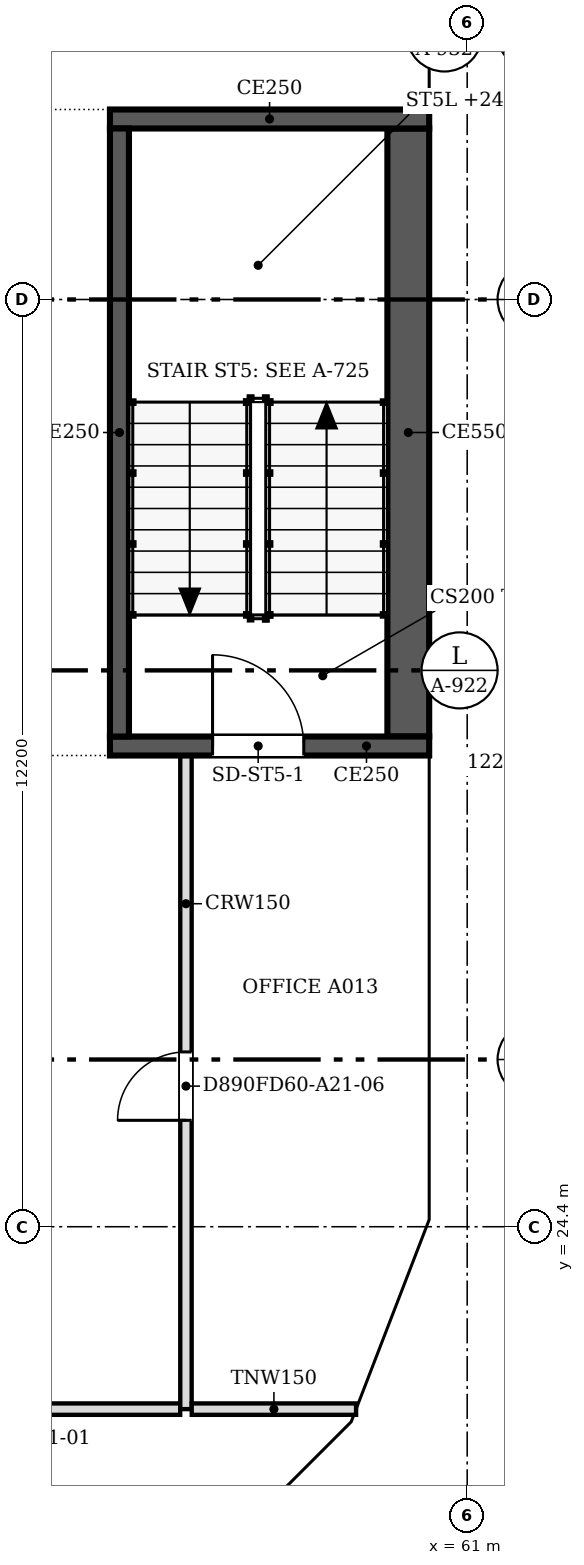
"""IFC4 building model, lengths in metres.
Left out: names, types, materials, properties, quantities, classifications, styles, units other than length and angle.
Written with IfcOpenShell. Run it as: python <this file> out.ifc"""

import sys

from ifc_helpers import new_model, si_unit, direction, frame, frame_2d, origin, place, context, subcontext, project, spatial, polyline, rectangle, outline, extrude, faceted_brep, source, transform, mapped, element, fill, save


model = new_model("IFC4")
c1 = context("Model", 3, precision=1e-05, world=origin(), true_north=direction((0.0, 1.0)))
c2 = subcontext(c1, "Body", "Model", "MODEL_VIEW")
j1 = project(units=[si_unit("LENGTHUNIT", "METRE"), si_unit("PLANEANGLEUNIT", "RADIAN")], contexts=[c1])
p1 = place(None, origin())
s1 = spatial("IfcSite", under=j1, at=p1, CompositionType="ELEMENT")
p2 = place(p1, origin())
s2 = spatial("IfcBuilding", under=s1, at=p2, CompositionType="ELEMENT")
p3 = place(p2, frame((0.0, 0.0, 240.7)))
s3 = spatial("IfcBuildingStorey", under=s2, at=p3, CompositionType="ELEMENT", Elevation=240.7)
m1 = source(origin(), c2, "Body", "Brep", [
    faceted_brep([(0.053, -0.25, 0.0), (2.997, -0.25, 3.8), (0.053, -0.25, 7.6), (0.0, -0.25, 7.532), (0.0, -0.25, 0.068), (0.106, 0.25, 7.532), (2.944, 0.25, 3.868), (2.944, 0.25, 3.732), (0.106, 0.25, 0.068), (2.997, 0.0, 3.8), (0.053, 0.0, 0.0), (0.053, 0.0, 7.6)], [[[0, 1, 2, 3, 4]], [[5, 6, 7, 8]], [[8, 7, 9, 1, 0, 10]], [[6, 5, 11, 2, 1, 9]], [[3, 2, 11]], [[10, 0, 4]], [[8, 10, 4, 3, 11, 5]], [[9, 7, 6]]]),
])
p4 = place(p3, frame((57.569, 19.574, -3.8), z_axis=(0.0, 0.0, 1.0), x_axis=(0.707106781187, 0.707106781187, 0.0)))
e1 = element("IfcWall", 1, at=p4, inside=s3, PredefinedType="SOLIDWALL", context=c2, shape_type="MappedRepresentation", body=[
    mapped(m1, transform((0.0, 0.0, 0.0), scale=1.0)),
])
m2 = source(origin(), c2, "Body", "SweptSolid", [
    extrude(outline(polyline([(0.253, 0.667), (2.681, 3.8), (0.253, 6.934), (0.253, 0.667)])), frame((0.0, 0.26, 0.0), z_axis=(0.0, -1.0, 0.0), x_axis=(1.0, 0.0, 0.0)), (0.0, 0.0, 1.0), 0.52),
])
p5 = place(p4, origin())
e2 = element("IfcOpeningElement", 2, at=p5, cuts=e1, PredefinedType="OPENING", context=c2, shape_type="MappedRepresentation", body=[
    mapped(m2, transform((0.0, 0.0, 0.0), scale=1.0)),
])
m3 = source(origin(), c2, "Body", "Brep", [
    faceted_brep([(2.95, -0.25, 0.0), (2.997, -0.25, 0.059), (2.997, -0.25, 7.541), (2.95, -0.25, 7.6), (0.0, -0.25, 3.8), (0.053, 0.25, 3.868), (2.904, 0.25, 7.54), (2.904, 0.25, 0.06), (0.053, 0.25, 3.732), (2.95, 0.0, 0.0), (2.95, 0.0, 7.6), (0.0, 0.0, 3.8)], [[[0, 1, 2, 3, 4]], [[5, 6, 7, 8]], [[1, 0, 9]], [[10, 3, 2]], [[6, 5, 11, 4, 3, 10]], [[8, 7, 9, 0, 4, 11]], [[8, 11, 5]], [[1, 9, 7, 6, 10, 2]]]),
])
p6 = place(p3, frame((59.688, 21.694, -3.8), z_axis=(0.0, 0.0, 1.0), x_axis=(0.359972353723, 0.932962970624, 0.0)))
e3 = element("IfcWall", 3, at=p6, inside=s3, PredefinedType="SOLIDWALL", context=c2, shape_type="MappedRepresentation", body=[
    mapped(m3, transform((0.0, 0.0, 0.0), scale=1.0)),
])
m4 = source(origin(), c2, "Body", "SweptSolid", [
    extrude(outline(polyline([(2.75, 6.935), (0.316, 3.8), (2.75, 0.665), (2.75, 6.935)])), frame((0.0, 0.26, 0.0), z_axis=(0.0, -1.0, 0.0), x_axis=(1.0, 0.0, 0.0)), (0.0, 0.0, 1.0), 0.52),
])
p7 = place(p6, origin())
e4 = element("IfcOpeningElement", 4, at=p7, cuts=e3, PredefinedType="OPENING", context=c2, shape_type="MappedRepresentation", body=[
    mapped(m4, transform((0.0, 0.0, 0.0), scale=1.0)),
])
m5 = source(origin(), c2, "Body", "Brep", [
    faceted_brep([(0.047, -0.25, 0.0), (3.05, -0.25, 3.8), (0.047, -0.25, 7.6), (0.0, -0.25, 7.54), (0.0, -0.25, 0.06), (0.093, 0.25, 7.541), (3.05, 0.25, 3.8), (0.093, 0.25, 0.059), (0.047, 0.0, 0.0), (0.047, 0.0, 7.6)], [[[0, 1, 2, 3, 4]], [[5, 6, 7]], [[7, 6, 1, 0, 8]], [[6, 5, 9, 2, 1]], [[3, 2, 9]], [[8, 0, 4]], [[7, 8, 4, 3, 9, 5]]]),
])
p8 = place(p3, frame((60.75, 24.4, -3.8), z_axis=(0.0, 0.0, 1.0), x_axis=(0.0, 1.0, 0.0)))
e5 = element("IfcWall", 5, at=p8, inside=s3, PredefinedType="SOLIDWALL", context=c2, shape_type="MappedRepresentation", body=[
    mapped(m5, transform((0.0, 0.0, 0.0), scale=1.0)),
])
m6 = source(origin(), c2, "Body", "SweptSolid", [
    extrude(outline(polyline([(0.247, 0.656), (2.731, 3.8), (0.247, 6.944), (0.247, 0.656)])), frame((0.0, 0.26, 0.0), z_axis=(0.0, -1.0, 0.0), x_axis=(1.0, 0.0, 0.0)), (0.0, 0.0, 1.0), 0.52),
])
p9 = place(p8, origin())
e6 = element("IfcOpeningElement", 6, at=p9, cuts=e5, PredefinedType="OPENING", context=c2, shape_type="MappedRepresentation", body=[
    mapped(m6, transform((0.0, 0.0, 0.0), scale=1.0)),
])
m7 = source(origin(), c2, "Body", "SweptSolid", [
    extrude(outline(polyline([(3.05, 0.0), (6.1, 3.8), (3.05, 7.6), (0.0, 3.8), (3.05, 0.0)])), frame((0.0, 0.25, 0.0), z_axis=(0.0, -1.0, 0.0), x_axis=(1.0, 0.0, 0.0)), (0.0, 0.0, 1.0), 0.5),
])
p10 = place(p3, frame((60.75, 27.45, -3.8), z_axis=(0.0, 0.0, 1.0), x_axis=(0.0, 1.0, 0.0)))
e7 = element("IfcWall", 7, at=p10, inside=s3, PredefinedType="SOLIDWALL", context=c2, shape_type="MappedRepresentation", body=[
    mapped(m7, transform((0.0, 0.0, 0.0), scale=1.0)),
])
m8 = source(origin(), c2, "Body", "SweptSolid", [
    extrude(outline(polyline([(3.05, 0.399), (5.78, 3.8), (3.05, 7.201), (0.321, 3.8), (3.05, 0.399)])), frame((0.0, 0.26, 0.0), z_axis=(0.0, -1.0, 0.0), x_axis=(1.0, 0.0, 0.0)), (0.0, 0.0, 1.0), 0.52),
])
p11 = place(p10, origin())
e8 = element("IfcOpeningElement", 8, at=p11, cuts=e7, PredefinedType="OPENING", context=c2, shape_type="MappedRepresentation", body=[
    mapped(m8, transform((0.0, 0.0, 0.0), scale=1.0)),
])
m9 = source(origin(), c2, "Body", "Brep", [
    faceted_brep([(3.05, -0.25, 0.0), (6.1, -0.25, 3.8), (6.1, -0.25, 3.8), (3.05, -0.25, 7.6), (0.0, -0.25, 3.8), (0.0, 0.25, 3.8), (3.05, 0.25, 7.6), (6.1, 0.25, 3.8), (6.1, 0.25, 3.8), (3.05, 0.25, 0.0)], [[[0, 1, 2, 3, 4]], [[5, 6, 7, 8, 9]], [[9, 8, 1, 0]], [[7, 6, 3, 2]], [[6, 5, 4, 3]], [[5, 9, 0, 4]], [[1, 8, 7, 2]]]),
])
p12 = place(p3, frame((60.75, 33.55, -3.8), z_axis=(0.0, 0.0, 1.0), x_axis=(0.0, 1.0, 0.0)))
e9 = element("IfcWall", 9, at=p12, inside=s3, PredefinedType="SOLIDWALL", context=c2, shape_type="MappedRepresentation", body=[
    mapped(m9, transform((0.0, 0.0, 0.0), scale=1.0)),
])
p13 = place(p12, origin())
e10 = element("IfcOpeningElement", 10, at=p13, cuts=e9, PredefinedType="OPENING", context=c2, shape_type="MappedRepresentation", body=[
    mapped(m8, transform((0.0, 0.0, 0.0), scale=1.0)),
])
p14 = place(p3, frame((60.75, 39.65, -3.8), z_axis=(0.0, 0.0, 1.0), x_axis=(0.0, 1.0, 0.0)))
e11 = element("IfcWall", 11, at=p14, inside=s3, PredefinedType="SOLIDWALL", context=c2, shape_type="MappedRepresentation", body=[
    mapped(m7, transform((0.0, 0.0, 0.0), scale=1.0)),
])
p15 = place(p14, origin())
e12 = element("IfcOpeningElement", 12, at=p15, cuts=e11, PredefinedType="OPENING", context=c2, shape_type="MappedRepresentation", body=[
    mapped(m8, transform((0.0, 0.0, 0.0), scale=1.0)),
])
p16 = place(p2, frame((0.0, 0.0, 244.5)))
s4 = spatial("IfcBuildingStorey", under=s2, at=p16, CompositionType="ELEMENT", Elevation=244.5)
m10 = source(origin(), c2, "Body", "Brep", [
    faceted_brep([(2.944, -0.25, 0.0), (2.997, -0.25, 0.068), (2.997, -0.25, 7.532), (2.944, -0.25, 7.6), (0.0, -0.25, 3.8), (0.053, 0.25, 3.868), (2.891, 0.25, 7.532), (2.891, 0.25, 0.068), (0.053, 0.25, 3.732), (2.944, 0.0, 0.0), (2.944, 0.0, 7.6), (0.0, 0.0, 3.8)], [[[0, 1, 2, 3, 4]], [[5, 6, 7, 8]], [[1, 0, 9]], [[10, 3, 2]], [[6, 5, 11, 4, 3, 10]], [[8, 7, 9, 0, 4, 11]], [[8, 11, 5]], [[1, 9, 7, 6, 10, 2]]]),
])
p17 = place(p16, frame((57.606, 19.612, -3.8), z_axis=(0.0, 0.0, 1.0), x_axis=(0.707106781187, 0.707106781187, 0.0)))
e13 = element("IfcWall", 13, at=p17, inside=s4, PredefinedType="SOLIDWALL", context=c2, shape_type="MappedRepresentation", body=[
    mapped(m10, transform((0.0, 0.0, 0.0), scale=1.0)),
])
m11 = source(origin(), c2, "Body", "SweptSolid", [
    extrude(outline(polyline([(2.744, 6.934), (0.316, 3.8), (2.744, 0.666), (2.744, 6.934)])), frame((0.0, 0.26, 0.0), z_axis=(0.0, -1.0, 0.0), x_axis=(1.0, 0.0, 0.0)), (0.0, 0.0, 1.0), 0.52),
])
p18 = place(p17, origin())
e14 = element("IfcOpeningElement", 14, at=p18, cuts=e13, PredefinedType="OPENING", context=c2, shape_type="MappedRepresentation", body=[
    mapped(m11, transform((0.0, 0.0, 0.0), scale=1.0)),
])
m12 = source(origin(), c2, "Body", "Brep", [
    faceted_brep([(0.053, -0.25, 0.0), (3.003, -0.25, 3.8), (0.053, -0.25, 7.6), (0.0, -0.25, 7.532), (0.0, -0.25, 0.068), (0.106, 0.25, 7.532), (2.957, 0.25, 3.86), (2.957, 0.25, 3.74), (0.106, 0.25, 0.068), (3.003, 0.0, 3.8), (0.053, 0.0, 0.0), (0.053, 0.0, 7.6)], [[[0, 1, 2, 3, 4]], [[5, 6, 7, 8]], [[8, 7, 9, 1, 0, 10]], [[6, 5, 11, 2, 1, 9]], [[3, 2, 11]], [[10, 0, 4]], [[8, 10, 4, 3, 11, 5]], [[9, 7, 6]]]),
])
p19 = place(p16, frame((59.669, 21.644, -3.8), z_axis=(0.0, 0.0, 1.0), x_axis=(0.35992665181, 0.932980602862, 0.0)))
e15 = element("IfcWall", 15, at=p19, inside=s4, PredefinedType="SOLIDWALL", context=c2, shape_type="MappedRepresentation", body=[
    mapped(m12, transform((0.0, 0.0, 0.0), scale=1.0)),
])
m13 = source(origin(), c2, "Body", "SweptSolid", [
    extrude(outline(polyline([(0.253, 0.665), (2.687, 3.8), (0.253, 6.935), (0.253, 0.665)])), frame((0.0, 0.26, 0.0), z_axis=(0.0, -1.0, 0.0), x_axis=(1.0, 0.0, 0.0)), (0.0, 0.0, 1.0), 0.52),
])
p20 = place(p19, origin())
e16 = element("IfcOpeningElement", 16, at=p20, cuts=e15, PredefinedType="OPENING", context=c2, shape_type="MappedRepresentation", body=[
    mapped(m13, transform((0.0, 0.0, 0.0), scale=1.0)),
])
m14 = source(origin(), c2, "Body", "Brep", [
    faceted_brep([(3.003, -0.25, 0.0), (6.053, -0.25, 3.8), (3.003, -0.25, 7.6), (0.0, -0.25, 3.8), (0.047, 0.25, 3.859), (3.003, 0.25, 7.6), (6.053, 0.25, 3.8), (3.003, 0.25, 0.0), (0.047, 0.25, 3.741), (0.0, 0.0, 3.8)], [[[0, 1, 2, 3]], [[4, 5, 6, 7, 8]], [[7, 6, 1, 0]], [[6, 5, 2, 1]], [[5, 4, 9, 3, 2]], [[8, 7, 0, 3, 9]], [[8, 9, 4]]]),
])
p21 = place(p16, frame((60.75, 24.447, -3.8), z_axis=(0.0, 0.0, 1.0), x_axis=(0.0, 1.0, 0.0)))
e17 = element("IfcWall", 17, at=p21, inside=s4, PredefinedType="SOLIDWALL", context=c2, shape_type="MappedRepresentation", body=[
    mapped(m14, transform((0.0, 0.0, 0.0), scale=1.0)),
])
m15 = source(origin(), c2, "Body", "SweptSolid", [
    extrude(outline(polyline([(3.005, 0.401), (5.733, 3.8), (3.005, 7.199), (0.319, 3.8), (3.005, 0.401)])), frame((0.0, 0.26, 0.0), z_axis=(0.0, -1.0, 0.0), x_axis=(1.0, 0.0, 0.0)), (0.0, 0.0, 1.0), 0.52),
])
p22 = place(p21, origin())
e18 = element("IfcOpeningElement", 18, at=p22, cuts=e17, PredefinedType="OPENING", context=c2, shape_type="MappedRepresentation", body=[
    mapped(m15, transform((0.0, 0.0, 0.0), scale=1.0)),
])
p23 = place(p16, frame((60.75, 30.5, -3.8), z_axis=(0.0, 0.0, 1.0), x_axis=(0.0, 1.0, 0.0)))
e19 = element("IfcWall", 19, at=p23, inside=s4, PredefinedType="SOLIDWALL", context=c2, shape_type="MappedRepresentation", body=[
    mapped(m7, transform((0.0, 0.0, 0.0), scale=1.0)),
])
p24 = place(p23, origin())
e20 = element("IfcOpeningElement", 20, at=p24, cuts=e19, PredefinedType="OPENING", context=c2, shape_type="MappedRepresentation", body=[
    mapped(m8, transform((0.0, 0.0, 0.0), scale=1.0)),
])
p25 = place(p16, frame((60.75, 36.6, -3.8), z_axis=(0.0, 0.0, 1.0), x_axis=(0.0, 1.0, 0.0)))
e21 = element("IfcWall", 21, at=p25, inside=s4, PredefinedType="SOLIDWALL", context=c2, shape_type="MappedRepresentation", body=[
    mapped(m9, transform((0.0, 0.0, 0.0), scale=1.0)),
])
p26 = place(p25, origin())
e22 = element("IfcOpeningElement", 22, at=p26, cuts=e21, PredefinedType="OPENING", context=c2, shape_type="MappedRepresentation", body=[
    mapped(m8, transform((0.0, 0.0, 0.0), scale=1.0)),
])
p27 = place(p3, frame((60.5, 30.725, 0.0), z_axis=(0.0, 0.0, 1.0), x_axis=(-1.0, 0.0, 0.0)))
e23 = element("IfcWall", 23, at=p27, inside=s3, PredefinedType="SOLIDWALL", context=c2, shape_type="SweptSolid", body=[
    extrude(rectangle(XDim=4.2, YDim=0.25, at=frame_2d((2.1, 0.0))), origin(), (0.0, 0.0, 1.0), 3.8),
])
m16 = source(origin(), c2, "Body", "SweptSolid", [
    extrude(rectangle(XDim=1.2, YDim=2.1, at=frame_2d((0.6, 1.05))), frame((0.0, 0.135, 0.0), z_axis=(0.0, -1.0, 0.0), x_axis=(1.0, 0.0, 0.0)), (0.0, 0.0, 1.0), 0.27),
])
p28 = place(p27, frame((1.65, 0.0, 0.0)))
e24 = element("IfcOpeningElement", 24, at=p28, cuts=e23, PredefinedType="OPENING", context=c2, shape_type="MappedRepresentation", body=[
    mapped(m16, transform((0.0, 0.0, 0.0), scale=1.0)),
])
p29 = place(p3, frame((56.425, 30.85, 0.0), z_axis=(0.0, 0.0, 1.0), x_axis=(0.0, 1.0, 0.0)))
e25 = element("IfcWall", 25, at=p29, inside=s3, PredefinedType="SOLIDWALL", context=c2, shape_type="SweptSolid", body=[
    extrude(rectangle(XDim=8.0, YDim=0.25, at=frame_2d((4.0, 0.0))), origin(), (0.0, 0.0, 1.0), 3.8),
])
p30 = place(p3, frame((56.3, 38.975, 0.0), z_axis=(0.0, 0.0, 1.0), x_axis=(1.0, 0.0, 0.0)))
e26 = element("IfcWall", 26, at=p30, inside=s3, PredefinedType="SOLIDWALL", context=c2, shape_type="SweptSolid", body=[
    extrude(rectangle(XDim=4.2, YDim=0.25, at=frame_2d((2.1, 0.0))), origin(), (0.0, 0.0, 1.0), 3.8),
])
p31 = place(p3, frame((60.225, 38.85, 0.0), z_axis=(0.0, 0.0, 1.0), x_axis=(0.0, -1.0, 0.0)))
e27 = element("IfcWall", 27, at=p31, inside=s3, PredefinedType="SOLIDWALL", context=c2, shape_type="SweptSolid", body=[
    extrude(rectangle(XDim=8.0, YDim=0.55, at=frame_2d((4.0, 0.0))), origin(), (0.0, 0.0, 1.0), 3.8),
])
p32 = place(p3, frame((57.224, 22.0, 0.0), z_axis=(0.0, 0.0, 1.0), x_axis=(-1.0, 0.0, 0.0)))
e28 = element("IfcWall", 28, at=p32, inside=s3, PredefinedType="PARTITIONING", context=c2, shape_type="SweptSolid", body=[
    extrude(rectangle(XDim=29.124, YDim=0.15, at=frame_2d((14.562, 0.0))), origin(), (0.0, 0.0, 1.0), 3.067),
])
m17 = source(origin(), c2, "Body", "SweptSolid", [
    extrude(rectangle(XDim=0.9, YDim=2.1, at=frame_2d((0.45, 1.05))), frame((0.0, 0.085, 0.0), z_axis=(0.0, -1.0, 0.0), x_axis=(1.0, 0.0, 0.0)), (0.0, 0.0, 1.0), 0.17),
])
p33 = place(p32, frame((1.923, 0.0, 0.0)))
e29 = element("IfcOpeningElement", 29, at=p33, cuts=e28, PredefinedType="OPENING", context=c2, shape_type="MappedRepresentation", body=[
    mapped(m17, transform((0.0, 0.0, 0.0), scale=1.0)),
])
p34 = place(p32, frame((22.624, 0.0, 0.0)))
e30 = element("IfcOpeningElement", 30, at=p34, cuts=e28, PredefinedType="OPENING", context=c2, shape_type="MappedRepresentation", body=[
    mapped(m17, transform((0.0, 0.0, 0.0), scale=1.0)),
])
p35 = place(p32, frame((10.424, 0.0, 0.0)))
e31 = element("IfcOpeningElement", 31, at=p35, cuts=e28, PredefinedType="OPENING", context=c2, shape_type="MappedRepresentation", body=[
    mapped(m17, transform((0.0, 0.0, 0.0), scale=1.0)),
])
p36 = place(p3, frame((57.3, 30.6, 0.0), z_axis=(0.0, 0.0, 1.0), x_axis=(0.0, -1.0, 0.0)))
e32 = element("IfcWall", 32, at=p36, inside=s3, PredefinedType="PARTITIONING", context=c2, shape_type="SweptSolid", body=[
    extrude(rectangle(XDim=8.6, YDim=0.15, at=frame_2d((4.3, 0.0))), origin(), (0.0, 0.0, 1.0), 3.067),
])
p37 = place(p36, frame((3.9, 0.0, 0.0)))
e33 = element("IfcOpeningElement", 33, at=p37, cuts=e32, PredefinedType="OPENING", context=c2, shape_type="MappedRepresentation", body=[
    mapped(m17, transform((0.0, 0.0, 0.0), scale=1.0)),
])
p38 = place(p3, frame((57.376, 22.0, 0.0), z_axis=(0.0, 0.0, 1.0), x_axis=(1.0, 0.0, 0.0)))
e34 = element("IfcWall", 34, at=p38, inside=s3, PredefinedType="PARTITIONING", context=c2, shape_type="SweptSolid", body=[
    extrude(rectangle(XDim=2.162, YDim=0.15, at=frame_2d((1.081, 0.0))), origin(), (0.0, 0.0, 1.0), 3.067),
])
m18 = source(origin(), c2, "Body", "SweptSolid", [
    extrude(rectangle(XDim=1.2, YDim=2.1, at=frame_2d((0.6, 1.05))), frame((0.0, 0.025, 0.0), z_axis=(0.0, -1.0, 0.0), x_axis=(1.0, 0.0, 0.0)), (0.0, 0.0, 1.0), 0.05),
])
p39 = place(p28, origin())
e35 = element("IfcDoor", 35, at=p39, inside=s3, OperationType="SINGLE_SWING_RIGHT", PredefinedType="DOOR", context=c2, shape_type="MappedRepresentation", body=[
    mapped(m18, transform((0.0, 0.0, 0.0), scale=1.0)),
])
fill(e24, e35)
m19 = source(origin(), c2, "Body", "SweptSolid", [
    extrude(rectangle(XDim=0.9, YDim=2.1, at=frame_2d((0.45, 1.05))), frame((0.0, 0.025, 0.0), z_axis=(0.0, -1.0, 0.0), x_axis=(1.0, 0.0, 0.0)), (0.0, 0.0, 1.0), 0.05),
])
p40 = place(p37, origin())
e36 = element("IfcDoor", 36, at=p40, inside=s3, OperationType="SINGLE_SWING_RIGHT", PredefinedType="DOOR", context=c2, shape_type="MappedRepresentation", body=[
    mapped(m19, transform((0.0, 0.0, 0.0), scale=1.0)),
])
fill(e33, e36)
save(model, sys.argv[1])
